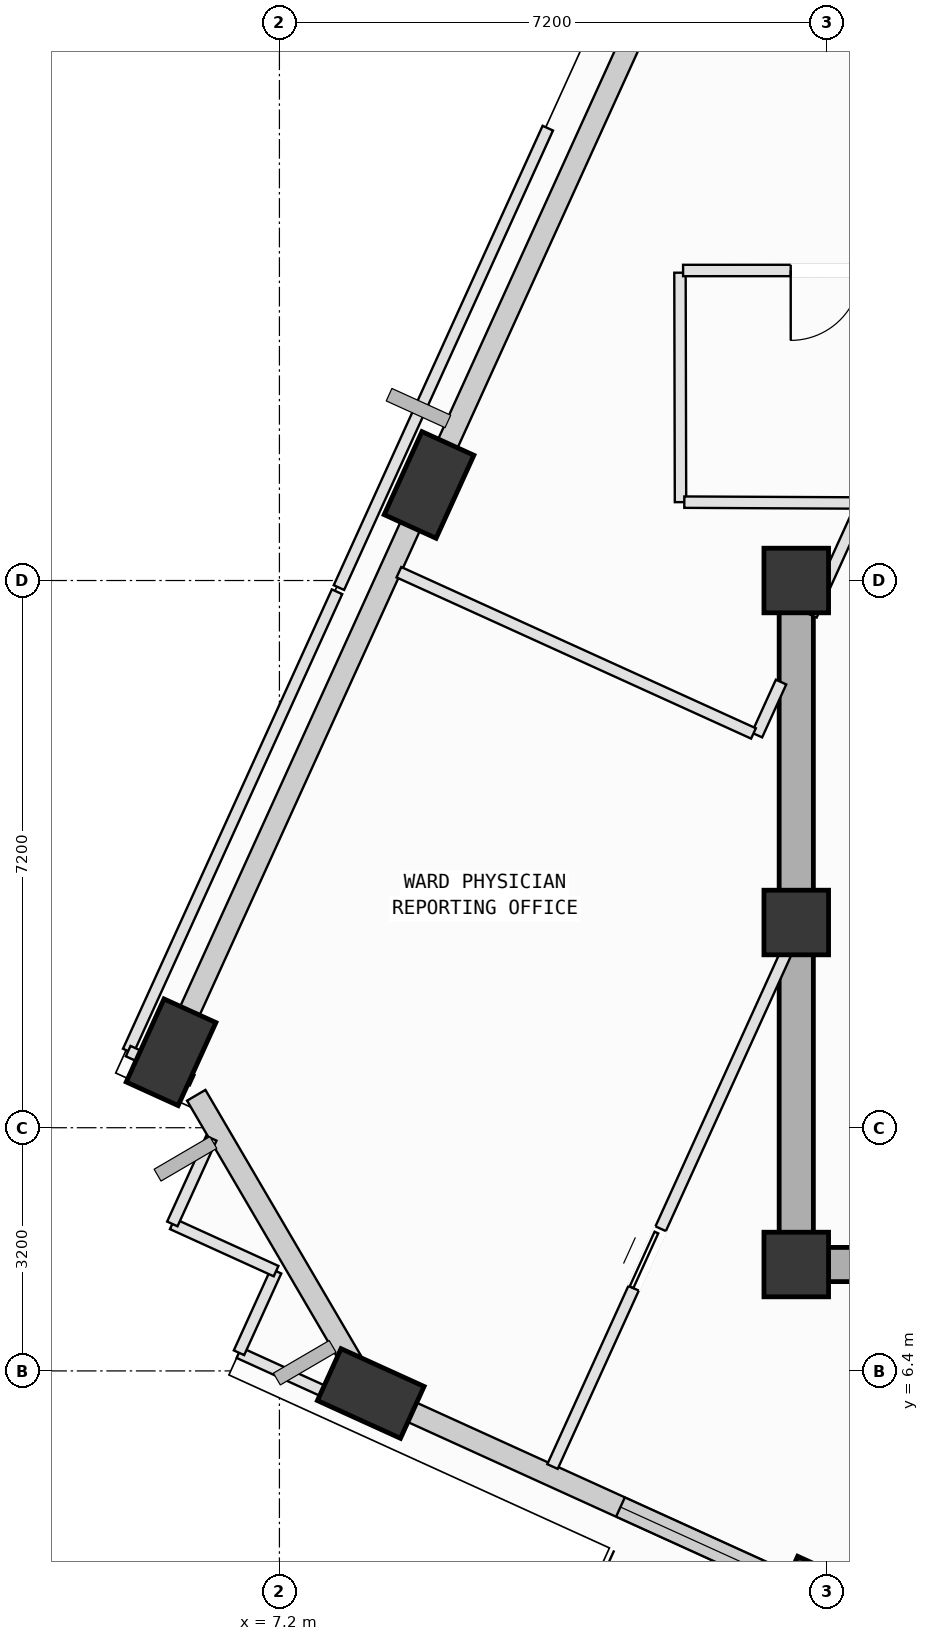
"""IFC4 building model, lengths in metres.
Left out: names, types, materials, properties, quantities, classifications, styles, units other than length and angle.
Written with IfcOpenShell. Run it as: python <this file> out.ifc"""

import sys

from ifc_helpers import new_model, si_unit, direction, frame, frame_2d, origin, origin_2d, place, context, subcontext, project, spatial, rectangle, extrude, element, fill, save


model = new_model("IFC4")
c1 = context("Model", 3, precision=1e-05, world=origin(), true_north=direction((0.0, 1.0)))
c2 = subcontext(c1, "Body", "Model", "MODEL_VIEW")
j1 = project(units=[si_unit("LENGTHUNIT", "METRE"), si_unit("PLANEANGLEUNIT", "RADIAN")], contexts=[c1])
p1 = place(None, origin())
s1 = spatial("IfcSite", under=j1, at=p1, CompositionType="ELEMENT")
p2 = place(p1, origin())
s2 = spatial("IfcBuilding", under=s1, at=p2, CompositionType="ELEMENT")
p3 = place(p2, frame((0.0, 0.0, 304.6)))
s3 = spatial("IfcBuildingStorey", under=s2, at=p3, CompositionType="ELEMENT", Elevation=304.6)
for number, where, z_axis, x_axis in (
    (1, (14.0, 7.8, 0.0), (0.0, 0.0, 1.0), (1.0, 0.0, 0.0)),
    (2, (14.0, 12.3, 0.0), (0.0, 0.0, 1.0), (1.0, 0.0, 0.0)),
    (3, (14.0, 16.8, 0.0), (0.0, 0.0, 1.0), (1.0, 0.0, 0.0)),
):
    element("IfcColumn", number, at=place(p3, frame(where, z_axis=z_axis, x_axis=x_axis)), inside=s3, PredefinedType="COLUMN", context=c2, shape_type="SweptSolid", body=[
        extrude(rectangle(XDim=0.85, YDim=0.85, at=origin_2d()), origin(), (0.0, 0.0, 1.0), 4.0),
    ])
p4 = place(p3, frame((9.168, 18.057, 0.002), z_axis=(0.028599058386, -0.100468120695, 0.994529160248), x_axis=(0.150218370029, 0.984069108153, 0.095091701455)))
e4 = element("IfcColumn", 4, at=p4, inside=s3, PredefinedType="COLUMN", context=c2, shape_type="SweptSolid", body=[
    extrude(rectangle(XDim=1.2, YDim=0.75, at=origin_2d()), origin(), (0.0, 0.0, 1.0), 3.944),
])
p5 = place(p3, frame((5.774, 10.593, 0.002), z_axis=(0.059390217496, -0.113882911838, 0.991717441844), x_axis=(-0.050455615166, 0.991858746318, 0.116920734907)))
e5 = element("IfcColumn", 5, at=p5, inside=s3, PredefinedType="COLUMN", context=c2, shape_type="SweptSolid", body=[
    extrude(rectangle(XDim=1.2, YDim=0.75, at=origin_2d()), origin(), (0.0, 0.0, 1.0), 3.938),
])
p6 = place(p3, frame((8.402, 6.103, 0.002), z_axis=(0.077762435781, -0.102962653255, 0.99164091062), x_axis=(-0.973786323253, -0.221106616924, 0.053404687048)))
e6 = element("IfcColumn", 6, at=p6, inside=s3, PredefinedType="COLUMN", context=c2, shape_type="SweptSolid", body=[
    extrude(rectangle(XDim=1.2, YDim=0.75, at=origin_2d()), origin(), (0.0, 0.0, 1.0), 3.953),
])
p7 = place(p3, frame((14.41, 3.371, 0.002), z_axis=(0.088860188702, -0.078300708321, 0.992961663882), x_axis=(-0.910187911133, -0.411284505845, 0.049020625044)))
e7 = element("IfcColumn", 7, at=p7, inside=s3, PredefinedType="COLUMN", context=c2, shape_type="SweptSolid", body=[
    extrude(rectangle(XDim=1.2, YDim=0.75, at=origin_2d()), origin(), (0.0, 0.0, 1.0), 3.954),
])
p8 = place(p3, frame((9.257, 18.252, 0.0), z_axis=(0.0, 0.0, 1.0), x_axis=(0.413924181298, 0.910311359996, 0.0)))
e8 = element("IfcWall", 8, at=p8, inside=s3, PredefinedType="SOLIDWALL", context=c2, shape_type="SweptSolid", body=[
    extrude(rectangle(XDim=7.434, YDim=0.28, at=frame_2d((3.717, 0.0))), origin(), (0.0, 0.0, 1.0), 3.265),
])
p9 = place(p3, frame((5.85, 10.758, 0.0), z_axis=(0.0, 0.0, 1.0), x_axis=(0.41389878739, 0.910322906334, 0.0)))
e9 = element("IfcWall", 9, at=p9, inside=s3, PredefinedType="SOLIDWALL", context=c2, shape_type="SweptSolid", body=[
    extrude(rectangle(XDim=7.485, YDim=0.28, at=frame_2d((3.742, 0.0))), origin(), (0.0, 0.0, 1.0), 3.265),
])
p10 = place(p3, frame((8.332, 6.222, 0.0), z_axis=(0.0, 0.0, 1.0), x_axis=(-0.505000103643, 0.863119282209, 0.0)))
e10 = element("IfcWall", 10, at=p10, inside=s3, PredefinedType="SOLIDWALL", context=c2, shape_type="SweptSolid", body=[
    extrude(rectangle(XDim=4.408, YDim=0.28, at=frame_2d((2.204, 0.0))), origin(), (0.0, 0.0, 1.0), 3.265),
])
p11 = place(p3, frame((14.261, 3.439, 0.0), z_axis=(0.0, 0.0, 1.0), x_axis=(-0.910309106428, 0.413929137359, 0.0)))
e11 = element("IfcWall", 11, at=p11, inside=s3, PredefinedType="SOLIDWALL", context=c2, shape_type="SweptSolid", body=[
    extrude(rectangle(XDim=5.83, YDim=0.28, at=frame_2d((2.915, 0.0))), origin(), (0.0, 0.0, 1.0), 3.265),
])
p12 = place(p11, frame((0.827, 0.0, 0.75)))
e12 = element("IfcOpeningElement", 12, at=p12, cuts=e11, PredefinedType="OPENING", context=c2, shape_type="SweptSolid", body=[
    extrude(rectangle(XDim=2.0, YDim=1.95, at=frame_2d((1.0, 0.975))), frame((0.0, 0.15, 0.0), z_axis=(0.0, -1.0, 0.0), x_axis=(1.0, 0.0, 0.0)), (0.0, 0.0, 1.0), 0.3),
])
p13 = place(p3, frame((14.0, 7.8, 0.0), z_axis=(0.0, 0.0, 1.0), x_axis=(1.0, 0.0, 0.0)))
e13 = element("IfcWall", 13, at=p13, inside=s3, PredefinedType="SHEAR", context=c2, shape_type="SweptSolid", body=[
    extrude(rectangle(XDim=10.8, YDim=0.45, at=frame_2d((5.4, 0.0))), origin(), (0.0, 0.0, 1.0), 3.78),
])
p14 = place(p3, frame((14.0, 16.8, 0.0), z_axis=(0.0, 0.0, 1.0), x_axis=(0.0, -1.0, 0.0)))
e14 = element("IfcWall", 14, at=p14, inside=s3, PredefinedType="SHEAR", context=c2, shape_type="SweptSolid", body=[
    extrude(rectangle(XDim=9.0, YDim=0.45, at=frame_2d((4.5, 0.0))), origin(), (0.0, 0.0, 1.0), 3.78),
])
p15 = place(p3, frame((10.793, 5.142, 0.0), z_axis=(0.0, 0.0, 1.0), x_axis=(0.413936344261, 0.910305829323, 0.0)))
e15 = element("IfcWall", 15, at=p15, inside=s3, PredefinedType="PARTITIONING", context=c2, shape_type="SweptSolid", body=[
    extrude(rectangle(XDim=7.446, YDim=0.15, at=frame_2d((3.723, 0.0))), origin(), (0.0, 0.0, 1.0), 3.78),
])
p16 = place(p15, frame((2.577, 0.0, 0.0)))
e16 = element("IfcOpeningElement", 16, at=p16, cuts=e15, PredefinedType="OPENING", context=c2, shape_type="SweptSolid", body=[
    extrude(rectangle(XDim=0.86, YDim=2.06, at=frame_2d((0.43, 1.03))), frame((0.0, 0.085, 0.0), z_axis=(0.0, -1.0, 0.0), x_axis=(1.0, 0.0, 0.0)), (0.0, 0.0, 1.0), 0.17),
])
p17 = place(p3, frame((8.858, 5.643, 0.0), z_axis=(0.0, 0.0, 1.0), x_axis=(-0.910300432563, 0.413948212311, 0.0)))
e17 = element("IfcWall", 17, at=p17, inside=s3, PredefinedType="PARTITIONING", context=c2, shape_type="SweptSolid", body=[
    extrude(rectangle(XDim=2.406, YDim=0.15, at=frame_2d((1.203, 0.0))), origin(), (0.0, 0.0, 1.0), 3.265),
])
p18 = place(p3, frame((6.668, 6.639, 0.0), z_axis=(0.0, 0.0, 1.0), x_axis=(0.413709385682, 0.910408998307, 0.0)))
e18 = element("IfcWall", 18, at=p18, inside=s3, PredefinedType="PARTITIONING", context=c2, shape_type="SweptSolid", body=[
    extrude(rectangle(XDim=1.18, YDim=0.15, at=frame_2d((0.59, 0.0))), origin(), (0.0, 0.0, 1.0), 3.78),
])
p19 = place(p3, frame((7.156, 7.713, 0.0), z_axis=(0.0, 0.0, 1.0), x_axis=(-0.91020472483, 0.414158615626, 0.0)))
e19 = element("IfcWall", 19, at=p19, inside=s3, PredefinedType="PARTITIONING", context=c2, shape_type="SweptSolid", body=[
    extrude(rectangle(XDim=1.5, YDim=0.15, at=frame_2d((0.75, 0.0))), origin(), (0.0, 0.0, 1.0), 3.78),
])
p20 = place(p3, frame((5.791, 8.334, 0.0), z_axis=(0.0, 0.0, 1.0), x_axis=(0.414263415126, 0.910157031994, 0.0)))
e20 = element("IfcWall", 20, at=p20, inside=s3, PredefinedType="PARTITIONING", context=c2, shape_type="SweptSolid", body=[
    extrude(rectangle(XDim=1.238, YDim=0.15, at=frame_2d((0.619, 0.0))), origin(), (0.0, 0.0, 1.0), 3.78),
])
p21 = place(p3, frame((12.47, 20.85, 0.0), z_axis=(0.0, 0.0, 1.0), x_axis=(0.002345133451, -0.999997250171, 0.0)))
e21 = element("IfcWall", 21, at=p21, inside=s3, PredefinedType="PARTITIONING", context=c2, shape_type="SweptSolid", body=[
    extrude(rectangle(XDim=3.019, YDim=0.15, at=frame_2d((1.51, 0.0))), origin(), (0.0, 0.0, 1.0), 3.78),
])
p22 = place(p3, frame((12.527, 17.831, 0.0), z_axis=(0.0, 0.0, 1.0), x_axis=(0.999988521863, -0.004791256759, 0.0)))
e22 = element("IfcWall", 22, at=p22, inside=s3, PredefinedType="PARTITIONING", context=c2, shape_type="SweptSolid", body=[
    extrude(rectangle(XDim=2.293, YDim=0.15, at=frame_2d((1.146, 0.0))), origin(), (0.0, 0.0, 1.0), 3.78),
])
p23 = place(p3, frame((14.82, 17.707, 0.0), z_axis=(0.0, 0.0, 1.0), x_axis=(-0.414110008053, -0.910226840535, 0.0)))
e23 = element("IfcWall", 23, at=p23, inside=s3, PredefinedType="PARTITIONING", context=c2, shape_type="SweptSolid", body=[
    extrude(rectangle(XDim=1.498, YDim=0.15, at=frame_2d((0.749, 0.0))), origin(), (0.0, 0.0, 1.0), 2.765),
])
p24 = place(p3, frame((13.8, 15.464, 0.0), z_axis=(0.0, 0.0, 1.0), x_axis=(-0.414139199178, -0.910213559394, 0.0)))
e24 = element("IfcWall", 24, at=p24, inside=s3, PredefinedType="PARTITIONING", context=c2, shape_type="SweptSolid", body=[
    extrude(rectangle(XDim=0.766, YDim=0.15, at=frame_2d((0.383, 0.0))), origin(), (0.0, 0.0, 1.0), 3.78),
])
p25 = place(p3, frame((13.437, 14.788, 0.0), z_axis=(0.0, 0.0, 1.0), x_axis=(-0.910338738777, 0.413863963981, 0.0)))
e25 = element("IfcWall", 25, at=p25, inside=s3, PredefinedType="PARTITIONING", context=c2, shape_type="SweptSolid", body=[
    extrude(rectangle(XDim=5.125, YDim=0.15, at=frame_2d((2.562, 0.0))), origin(), (0.0, 0.0, 1.0), 3.78),
])
p26 = place(p3, frame((8.775, 17.65, 0.0), z_axis=(0.0, 0.0, 1.0), x_axis=(0.413704460003, 0.910411236625, 0.0)))
e26 = element("IfcWall", 26, at=p26, inside=s3, PredefinedType="PARTITIONING", context=c2, shape_type="SweptSolid", body=[
    extrude(rectangle(XDim=0.747, YDim=0.15, at=frame_2d((0.374, 0.0))), origin(), (0.0, 0.0, 1.0), 3.78),
])
p27 = place(p3, frame((16.263, 20.88, 0.0), z_axis=(0.0, 0.0, 1.0), x_axis=(-0.999999966127, -0.000260281095, 0.0)))
e27 = element("IfcWall", 27, at=p27, inside=s3, PredefinedType="PARTITIONING", context=c2, shape_type="SweptSolid", body=[
    extrude(rectangle(XDim=3.752, YDim=0.15, at=frame_2d((1.876, 0.0))), origin(), (0.0, 0.0, 1.0), 3.415),
])
p28 = place(p27, frame((1.416, 0.0, 0.0)))
e28 = element("IfcOpeningElement", 28, at=p28, cuts=e27, PredefinedType="OPENING", context=c2, shape_type="SweptSolid", body=[
    extrude(rectangle(XDim=0.92, YDim=2.1, at=frame_2d((0.46, 1.05))), frame((0.0, 0.085, 0.0), z_axis=(0.0, -1.0, 0.0), x_axis=(1.0, 0.0, 0.0)), (0.0, 0.0, 1.0), 0.17),
])
p29 = place(p3, frame((5.21, 10.608, 0.0), z_axis=(0.0, 0.0, 1.0), x_axis=(0.41388882426, 0.91032743623, 0.0)))
e29 = element("IfcWall", 29, at=p29, inside=s3, PredefinedType="PARTITIONING", context=c2, shape_type="SweptSolid", body=[
    extrude(rectangle(XDim=6.64, YDim=0.15, at=frame_2d((3.32, 0.0))), origin(), (0.0, 0.0, 1.0), 3.78),
])
p30 = place(p3, frame((6.052, 10.225, 0.0), z_axis=(0.0, 0.0, 1.0), x_axis=(-0.910339358078, 0.413862601759, 0.0)))
e30 = element("IfcWall", 30, at=p30, inside=s3, PredefinedType="PARTITIONING", context=c2, shape_type="SweptSolid", body=[
    extrude(rectangle(XDim=0.925, YDim=0.15, at=frame_2d((0.462, 0.0))), origin(), (0.0, 0.0, 1.0), 3.78),
])
p31 = place(p3, frame((7.983, 16.707, 0.0), z_axis=(0.0, 0.0, 1.0), x_axis=(0.41384726545, 0.910346330184, 0.0)))
e31 = element("IfcWall", 31, at=p31, inside=s3, PredefinedType="PARTITIONING", context=c2, shape_type="SweptSolid", body=[
    extrude(rectangle(XDim=6.64, YDim=0.15, at=frame_2d((3.32, 0.0))), origin(), (0.0, 0.0, 1.0), 3.78),
])
p32 = place(p12, origin())
e32 = element("IfcWindow", 32, at=p32, inside=s3, PartitioningType="SINGLE_PANEL", PredefinedType="WINDOW", context=c2, shape_type="SweptSolid", body=[
    extrude(rectangle(XDim=2.0, YDim=1.95, at=frame_2d((1.0, 0.975))), frame((0.0, 0.03, 0.0), z_axis=(0.0, -1.0, 0.0), x_axis=(1.0, 0.0, 0.0)), (0.0, 0.0, 1.0), 0.06),
])
fill(e12, e32)
p33 = place(p28, origin())
e33 = element("IfcDoor", 33, at=p33, inside=s3, OperationType="SINGLE_SWING_RIGHT", PredefinedType="DOOR", context=c2, shape_type="SweptSolid", body=[
    extrude(rectangle(XDim=0.92, YDim=2.1, at=frame_2d((0.46, 1.05))), frame((0.0, 0.025, 0.0), z_axis=(0.0, -1.0, 0.0), x_axis=(1.0, 0.0, 0.0)), (0.0, 0.0, 1.0), 0.05),
])
fill(e28, e33)
p34 = place(p16, origin())
e34 = element("IfcDoor", 34, at=p34, inside=s3, OperationType="SLIDING_TO_LEFT", PredefinedType="DOOR", context=c2, shape_type="SweptSolid", body=[
    extrude(rectangle(XDim=0.86, YDim=2.06, at=frame_2d((0.43, 1.03))), frame((0.0, 0.025, 0.0), z_axis=(0.0, -1.0, 0.0), x_axis=(1.0, 0.0, 0.0)), (0.0, 0.0, 1.0), 0.05),
])
fill(e16, e34)
save(model, sys.argv[1])
